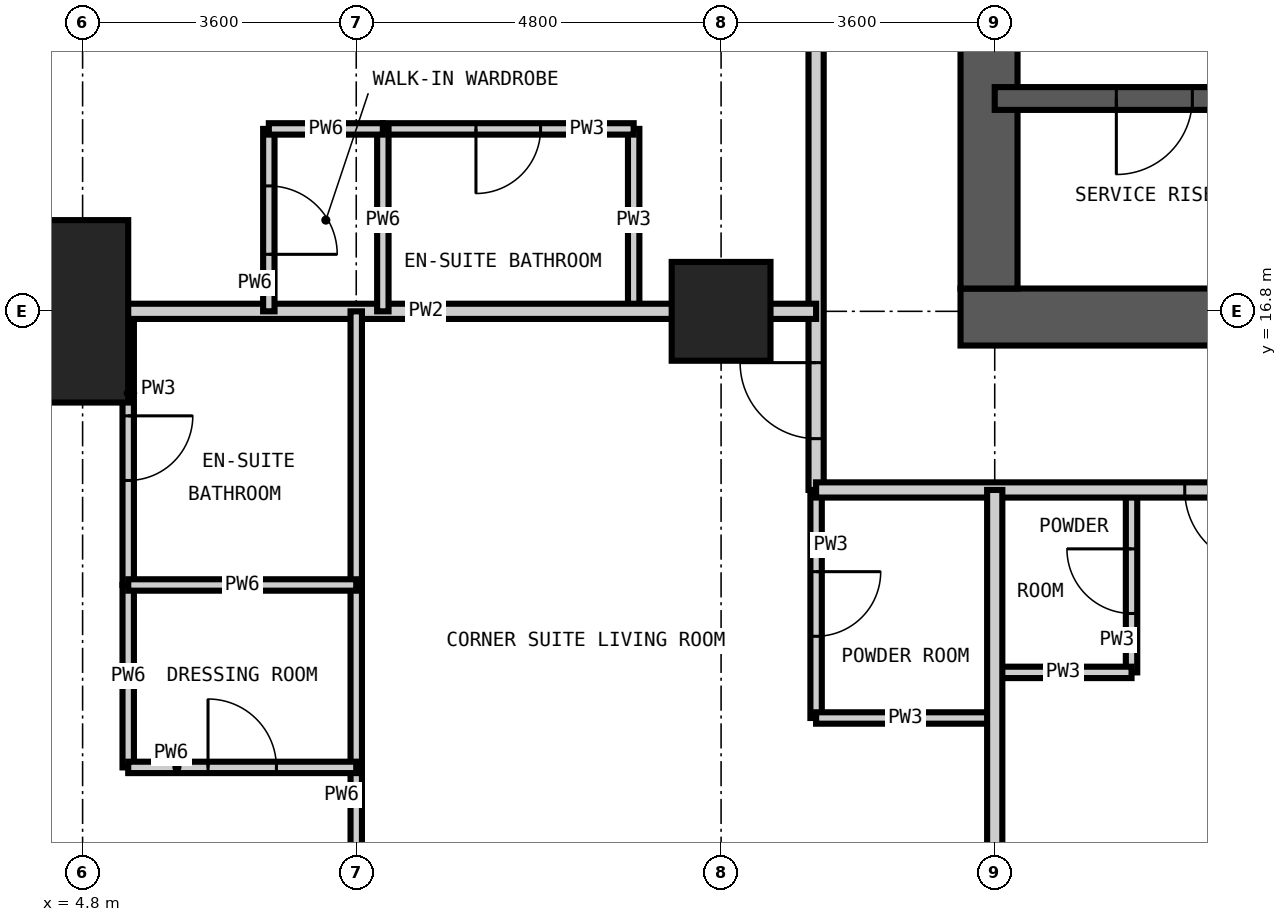
"""IFC4 building model, lengths in metres.
Left out: names, types, materials, properties, quantities, classifications, styles, units other than length and angle.
Written with IfcOpenShell. Run it as: python <this file> out.ifc"""

import sys

from ifc_helpers import new_model, si_unit, direction, frame, frame_2d, origin, origin_2d, place, context, subcontext, project, spatial, rectangle, extrude, element, fill, save


model = new_model("IFC4")
c1 = context("Model", 3, precision=1e-05, world=origin(), true_north=direction((0.0, 1.0)))
c2 = subcontext(c1, "Body", "Model", "MODEL_VIEW")
j1 = project(units=[si_unit("LENGTHUNIT", "METRE"), si_unit("PLANEANGLEUNIT", "RADIAN")], contexts=[c1])
p1 = place(None, origin())
s1 = spatial("IfcSite", under=j1, at=p1, CompositionType="ELEMENT")
p2 = place(p1, origin())
s2 = spatial("IfcBuilding", under=s1, at=p2, CompositionType="ELEMENT")
p3 = place(p2, frame((0.0, 0.0, 177.0)))
s3 = spatial("IfcBuildingStorey", under=s2, at=p3, CompositionType="ELEMENT", Elevation=177.0)
p4 = place(p3, frame((4.8, 16.8, -0.35), z_axis=(0.0, 0.0, 1.0), x_axis=(1.0, 0.0, 0.0)))
e1 = element("IfcColumn", 1, at=p4, inside=s3, PredefinedType="COLUMN", context=c2, shape_type="SweptSolid", body=[
    extrude(rectangle(XDim=1.2, YDim=2.4, at=origin_2d()), origin(), (0.0, 0.0, 1.0), 3.6),
])
p5 = place(p3, frame((13.2, 16.8, -0.35), z_axis=(0.0, 0.0, 1.0), x_axis=(1.0, 0.0, 0.0)))
e2 = element("IfcColumn", 2, at=p5, inside=s3, PredefinedType="COLUMN", context=c2, shape_type="SweptSolid", body=[
    extrude(rectangle(XDim=1.3, YDim=1.3, at=origin_2d()), origin(), (0.0, 0.0, 1.0), 3.6),
])
p6 = place(p3, frame((16.35, 16.725, -0.35), z_axis=(0.0, 0.0, 1.0), x_axis=(1.0, 0.0, 0.0)))
e3 = element("IfcWall", 3, at=p6, inside=s3, PredefinedType="SHEAR", context=c2, shape_type="SweptSolid", body=[
    extrude(rectangle(XDim=26.1, YDim=0.75, at=frame_2d((13.05, 0.0))), origin(), (0.0, 0.0, 1.0), 3.6),
])
p7 = place(p6, frame((12.55, 0.0, 0.35)))
e4 = element("IfcOpeningElement", 4, at=p7, cuts=e3, PredefinedType="OPENING", context=c2, shape_type="SweptSolid", body=[
    extrude(rectangle(XDim=1.0, YDim=2.1, at=frame_2d((0.5, 1.05))), frame((0.0, 0.385, 0.0), z_axis=(0.0, -1.0, 0.0), x_axis=(1.0, 0.0, 0.0)), (0.0, 0.0, 1.0), 0.77),
])
p8 = place(p6, frame((18.85, 0.0, 0.35)))
e5 = element("IfcOpeningElement", 5, at=p8, cuts=e3, PredefinedType="OPENING", context=c2, shape_type="SweptSolid", body=[
    extrude(rectangle(XDim=1.0, YDim=2.1, at=frame_2d((0.5, 1.05))), frame((0.0, 0.385, 0.0), z_axis=(0.0, -1.0, 0.0), x_axis=(1.0, 0.0, 0.0)), (0.0, 0.0, 1.0), 0.77),
])
p9 = place(p3, frame((16.725, 41.7, -0.35), z_axis=(0.0, 0.0, 1.0), x_axis=(0.0, -1.0, 0.0)))
e6 = element("IfcWall", 6, at=p9, inside=s3, PredefinedType="SHEAR", context=c2, shape_type="SweptSolid", body=[
    extrude(rectangle(XDim=24.6, YDim=0.75, at=frame_2d((12.3, 0.0))), origin(), (0.0, 0.0, 1.0), 3.6),
])
p10 = place(p9, frame((11.4, 0.0, 0.35)))
e7 = element("IfcOpeningElement", 7, at=p10, cuts=e6, PredefinedType="OPENING", context=c2, shape_type="SweptSolid", body=[
    extrude(rectangle(XDim=1.8, YDim=2.2, at=frame_2d((0.9, 1.1))), frame((0.0, 0.385, 0.0), z_axis=(0.0, -1.0, 0.0), x_axis=(1.0, 0.0, 0.0)), (0.0, 0.0, 1.0), 0.77),
])
p11 = place(p9, frame((20.2, 0.0, 0.35)))
e8 = element("IfcOpeningElement", 8, at=p11, cuts=e6, PredefinedType="OPENING", context=c2, shape_type="SweptSolid", body=[
    extrude(rectangle(XDim=1.0, YDim=2.1, at=frame_2d((0.5, 1.05))), frame((0.0, 0.385, 0.0), z_axis=(0.0, -1.0, 0.0), x_axis=(1.0, 0.0, 0.0)), (0.0, 0.0, 1.0), 0.77),
])
p12 = place(p9, frame((5.5, 0.0, 0.35)))
e9 = element("IfcOpeningElement", 9, at=p12, cuts=e6, PredefinedType="OPENING", context=c2, shape_type="SweptSolid", body=[
    extrude(rectangle(XDim=1.0, YDim=2.1, at=frame_2d((0.5, 1.05))), frame((0.0, 0.385, 0.0), z_axis=(0.0, -1.0, 0.0), x_axis=(1.0, 0.0, 0.0)), (0.0, 0.0, 1.0), 0.77),
])
p13 = place(p3, frame((16.8, 19.6, -0.35), z_axis=(0.0, 0.0, 1.0), x_axis=(1.0, 0.0, 0.0)))
e10 = element("IfcWall", 10, at=p13, inside=s3, PredefinedType="SHEAR", context=c2, shape_type="SweptSolid", body=[
    extrude(rectangle(XDim=8.4, YDim=0.3, at=frame_2d((4.2, 0.0))), origin(), (0.0, 0.0, 1.0), 3.6),
])
p14 = place(p13, frame((1.6, 0.0, 0.35)))
e11 = element("IfcOpeningElement", 11, at=p14, cuts=e10, PredefinedType="OPENING", context=c2, shape_type="SweptSolid", body=[
    extrude(rectangle(XDim=1.0, YDim=2.1, at=frame_2d((0.5, 1.05))), frame((0.0, 0.16, 0.0), z_axis=(0.0, -1.0, 0.0), x_axis=(1.0, 0.0, 0.0)), (0.0, 0.0, 1.0), 0.32),
])
p15 = place(p13, frame((5.8, 0.0, 0.35)))
e12 = element("IfcOpeningElement", 12, at=p15, cuts=e10, PredefinedType="OPENING", context=c2, shape_type="SweptSolid", body=[
    extrude(rectangle(XDim=1.0, YDim=2.1, at=frame_2d((0.5, 1.05))), frame((0.0, 0.16, 0.0), z_axis=(0.0, -1.0, 0.0), x_axis=(1.0, 0.0, 0.0)), (0.0, 0.0, 1.0), 0.32),
])
p16 = place(p3, frame((5.4, 13.2, 0.0), z_axis=(0.0, 0.0, 1.0), x_axis=(0.0, 1.0, 0.0)))
e13 = element("IfcWall", 13, at=p16, inside=s3, PredefinedType="PARTITIONING", context=c2, shape_type="SweptSolid", body=[
    extrude(rectangle(XDim=3.6, YDim=0.15, at=frame_2d((1.8, 0.0))), origin(), (0.0, 0.0, 1.0), 3.25),
])
p17 = place(p16, frame((1.375, 0.0, 0.0)))
e14 = element("IfcOpeningElement", 14, at=p17, cuts=e13, PredefinedType="OPENING", context=c2, shape_type="SweptSolid", body=[
    extrude(rectangle(XDim=0.85, YDim=2.1, at=frame_2d((0.425, 1.05))), frame((0.0, 0.085, 0.0), z_axis=(0.0, -1.0, 0.0), x_axis=(1.0, 0.0, 0.0)), (0.0, 0.0, 1.0), 0.17),
])
p18 = place(p3, frame((12.05, 16.8, 0.0), z_axis=(0.0, 0.0, 1.0), x_axis=(0.0, 1.0, 0.0)))
e15 = element("IfcWall", 15, at=p18, inside=s3, PredefinedType="PARTITIONING", context=c2, shape_type="SweptSolid", body=[
    extrude(rectangle(XDim=2.4, YDim=0.15, at=frame_2d((1.2, 0.0))), origin(), (0.0, 0.0, 1.0), 3.25),
])
p19 = place(p3, frame((14.45, 11.45, 0.0), z_axis=(0.0, 0.0, 1.0), x_axis=(0.0, 1.0, 0.0)))
e16 = element("IfcWall", 16, at=p19, inside=s3, PredefinedType="PARTITIONING", context=c2, shape_type="SweptSolid", body=[
    extrude(rectangle(XDim=3.0, YDim=0.15, at=frame_2d((1.5, 0.0))), origin(), (0.0, 0.0, 1.0), 3.25),
])
p20 = place(p19, frame((1.075, 0.0, 0.0)))
e17 = element("IfcOpeningElement", 17, at=p20, cuts=e16, PredefinedType="OPENING", context=c2, shape_type="SweptSolid", body=[
    extrude(rectangle(XDim=0.85, YDim=2.1, at=frame_2d((0.425, 1.05))), frame((0.0, 0.085, 0.0), z_axis=(0.0, -1.0, 0.0), x_axis=(1.0, 0.0, 0.0)), (0.0, 0.0, 1.0), 0.17),
])
p21 = place(p3, frame((18.6, 12.05, 0.0), z_axis=(0.0, 0.0, 1.0), x_axis=(0.0, 1.0, 0.0)))
e18 = element("IfcWall", 18, at=p21, inside=s3, PredefinedType="PARTITIONING", context=c2, shape_type="SweptSolid", body=[
    extrude(rectangle(XDim=2.4, YDim=0.15, at=frame_2d((1.2, 0.0))), origin(), (0.0, 0.0, 1.0), 3.25),
])
p22 = place(p21, frame((0.775, 0.0, 0.0)))
e19 = element("IfcOpeningElement", 19, at=p22, cuts=e18, PredefinedType="OPENING", context=c2, shape_type="SweptSolid", body=[
    extrude(rectangle(XDim=0.85, YDim=2.1, at=frame_2d((0.425, 1.05))), frame((0.0, 0.085, 0.0), z_axis=(0.0, -1.0, 0.0), x_axis=(1.0, 0.0, 0.0)), (0.0, 0.0, 1.0), 0.17),
])
p23 = place(p3, frame((14.45, 11.45, 0.0), z_axis=(0.0, 0.0, 1.0), x_axis=(1.0, 0.0, 0.0)))
e20 = element("IfcWall", 20, at=p23, inside=s3, PredefinedType="PARTITIONING", context=c2, shape_type="SweptSolid", body=[
    extrude(rectangle(XDim=2.35, YDim=0.15, at=frame_2d((1.175, 0.0))), origin(), (0.0, 0.0, 1.0), 3.25),
])
p24 = place(p3, frame((16.8, 12.05, 0.0), z_axis=(0.0, 0.0, 1.0), x_axis=(1.0, 0.0, 0.0)))
e21 = element("IfcWall", 21, at=p24, inside=s3, PredefinedType="PARTITIONING", context=c2, shape_type="SweptSolid", body=[
    extrude(rectangle(XDim=1.8, YDim=0.15, at=frame_2d((0.9, 0.0))), origin(), (0.0, 0.0, 1.0), 3.25),
])
p25 = place(p3, frame((8.75, 19.2, 0.0), z_axis=(0.0, 0.0, 1.0), x_axis=(1.0, 0.0, 0.0)))
e22 = element("IfcWall", 22, at=p25, inside=s3, PredefinedType="PARTITIONING", context=c2, shape_type="SweptSolid", body=[
    extrude(rectangle(XDim=3.3, YDim=0.15, at=frame_2d((1.65, 0.0))), origin(), (0.0, 0.0, 1.0), 3.25),
])
p26 = place(p25, frame((1.225, 0.0, 0.0)))
e23 = element("IfcOpeningElement", 23, at=p26, cuts=e22, PredefinedType="OPENING", context=c2, shape_type="SweptSolid", body=[
    extrude(rectangle(XDim=0.85, YDim=2.1, at=frame_2d((0.425, 1.05))), frame((0.0, 0.085, 0.0), z_axis=(0.0, -1.0, 0.0), x_axis=(1.0, 0.0, 0.0)), (0.0, 0.0, 1.0), 0.17),
])
p27 = place(p3, frame((14.45, 14.45, 0.0), z_axis=(0.0, 0.0, 1.0), x_axis=(0.0, 1.0, 0.0)))
e24 = element("IfcWall", 24, at=p27, inside=s3, PredefinedType="PARTITIONING", context=c2, shape_type="SweptSolid", body=[
    extrude(rectangle(XDim=31.1, YDim=0.2, at=frame_2d((15.55, 0.0))), origin(), (0.0, 0.0, 1.0), 3.25),
])
p28 = place(p27, frame((6.05, 0.0, 0.0)))
e25 = element("IfcOpeningElement", 25, at=p28, cuts=e24, PredefinedType="OPENING", context=c2, shape_type="SweptSolid", body=[
    extrude(rectangle(XDim=1.0, YDim=2.2, at=frame_2d((0.5, 1.1))), frame((0.0, 0.11, 0.0), z_axis=(0.0, -1.0, 0.0), x_axis=(1.0, 0.0, 0.0)), (0.0, 0.0, 1.0), 0.22),
])
p29 = place(p27, frame((11.95, 0.0, 0.0)))
e26 = element("IfcOpeningElement", 26, at=p29, cuts=e24, PredefinedType="OPENING", context=c2, shape_type="SweptSolid", body=[
    extrude(rectangle(XDim=1.8, YDim=2.4, at=frame_2d((0.9, 1.2))), frame((0.0, 0.11, 0.0), z_axis=(0.0, -1.0, 0.0), x_axis=(1.0, 0.0, 0.0)), (0.0, 0.0, 1.0), 0.22),
])
p30 = place(p27, frame((19.575, 0.0, 0.0)))
e27 = element("IfcOpeningElement", 27, at=p30, cuts=e24, PredefinedType="OPENING", context=c2, shape_type="SweptSolid", body=[
    extrude(rectangle(XDim=1.0, YDim=2.2, at=frame_2d((0.5, 1.1))), frame((0.0, 0.11, 0.0), z_axis=(0.0, -1.0, 0.0), x_axis=(1.0, 0.0, 0.0)), (0.0, 0.0, 1.0), 0.22),
])
p31 = place(p27, frame((24.95, 0.0, 0.0)))
e28 = element("IfcOpeningElement", 28, at=p31, cuts=e24, PredefinedType="OPENING", context=c2, shape_type="SweptSolid", body=[
    extrude(rectangle(XDim=1.0, YDim=2.2, at=frame_2d((0.5, 1.1))), frame((0.0, 0.11, 0.0), z_axis=(0.0, -1.0, 0.0), x_axis=(1.0, 0.0, 0.0)), (0.0, 0.0, 1.0), 0.22),
])
p32 = place(p27, frame((0.675, 0.0, 0.0)))
e29 = element("IfcOpeningElement", 29, at=p32, cuts=e24, PredefinedType="OPENING", context=c2, shape_type="SweptSolid", body=[
    extrude(rectangle(XDim=1.0, YDim=2.2, at=frame_2d((0.5, 1.1))), frame((0.0, 0.11, 0.0), z_axis=(0.0, -1.0, 0.0), x_axis=(1.0, 0.0, 0.0)), (0.0, 0.0, 1.0), 0.22),
])
p33 = place(p27, frame((28.825, 0.0, 0.0)))
e30 = element("IfcOpeningElement", 30, at=p33, cuts=e24, PredefinedType="OPENING", context=c2, shape_type="SweptSolid", body=[
    extrude(rectangle(XDim=1.0, YDim=2.2, at=frame_2d((0.5, 1.1))), frame((0.0, 0.11, 0.0), z_axis=(0.0, -1.0, 0.0), x_axis=(1.0, 0.0, 0.0)), (0.0, 0.0, 1.0), 0.22),
])
p34 = place(p3, frame((44.95, 14.45, 0.0), z_axis=(0.0, 0.0, 1.0), x_axis=(-1.0, 0.0, 0.0)))
e31 = element("IfcWall", 31, at=p34, inside=s3, PredefinedType="PARTITIONING", context=c2, shape_type="SweptSolid", body=[
    extrude(rectangle(XDim=30.5, YDim=0.2, at=frame_2d((15.25, 0.0))), origin(), (0.0, 0.0, 1.0), 3.25),
])
p35 = place(p34, frame((24.65, 0.0, 0.0)))
e32 = element("IfcOpeningElement", 32, at=p35, cuts=e31, PredefinedType="OPENING", context=c2, shape_type="SweptSolid", body=[
    extrude(rectangle(XDim=1.0, YDim=2.2, at=frame_2d((0.5, 1.1))), frame((0.0, 0.11, 0.0), z_axis=(0.0, -1.0, 0.0), x_axis=(1.0, 0.0, 0.0)), (0.0, 0.0, 1.0), 0.22),
])
p36 = place(p34, frame((13.85, 0.0, 0.0)))
e33 = element("IfcOpeningElement", 33, at=p36, cuts=e31, PredefinedType="OPENING", context=c2, shape_type="SweptSolid", body=[
    extrude(rectangle(XDim=1.0, YDim=2.2, at=frame_2d((0.5, 1.1))), frame((0.0, 0.11, 0.0), z_axis=(0.0, -1.0, 0.0), x_axis=(1.0, 0.0, 0.0)), (0.0, 0.0, 1.0), 0.22),
])
p37 = place(p34, frame((7.85, 0.0, 0.0)))
e34 = element("IfcOpeningElement", 34, at=p37, cuts=e31, PredefinedType="OPENING", context=c2, shape_type="SweptSolid", body=[
    extrude(rectangle(XDim=1.0, YDim=2.2, at=frame_2d((0.5, 1.1))), frame((0.0, 0.11, 0.0), z_axis=(0.0, -1.0, 0.0), x_axis=(1.0, 0.0, 0.0)), (0.0, 0.0, 1.0), 0.22),
])
for number, where, z_axis, x_axis in (
    (35, (16.8, 4.182, 0.0), (0.0, 0.0, 1.0), (0.0, 1.0, 0.0)),
    (36, (4.182, 16.8, 0.0), (0.0, 0.0, 1.0), (1.0, 0.0, 0.0)),
):
    element("IfcWall", number, at=place(p3, frame(where, z_axis=z_axis, x_axis=x_axis)), inside=s3, PredefinedType="PARTITIONING", context=c2, shape_type="SweptSolid", body=[
        extrude(rectangle(XDim=10.268, YDim=0.2, at=frame_2d((5.134, 0.0))), origin(), (0.0, 0.0, 1.0), 3.25),
    ])
p38 = place(p3, frame((5.4, 10.8, 0.0), z_axis=(0.0, 0.0, 1.0), x_axis=(0.0, 1.0, 0.0)))
e37 = element("IfcWall", 37, at=p38, inside=s3, PredefinedType="PARTITIONING", context=c2, shape_type="SweptSolid", body=[
    extrude(rectangle(XDim=2.4, YDim=0.15, at=frame_2d((1.2, 0.0))), origin(), (0.0, 0.0, 1.0), 3.25),
])
p39 = place(p3, frame((7.25, 16.8, 0.0), z_axis=(0.0, 0.0, 1.0), x_axis=(0.0, 1.0, 0.0)))
e38 = element("IfcWall", 38, at=p39, inside=s3, PredefinedType="PARTITIONING", context=c2, shape_type="SweptSolid", body=[
    extrude(rectangle(XDim=2.4, YDim=0.15, at=frame_2d((1.2, 0.0))), origin(), (0.0, 0.0, 1.0), 3.25),
])
p40 = place(p39, frame((0.75, 0.0, 0.0)))
e39 = element("IfcOpeningElement", 39, at=p40, cuts=e38, PredefinedType="OPENING", context=c2, shape_type="SweptSolid", body=[
    extrude(rectangle(XDim=0.9, YDim=2.1, at=frame_2d((0.45, 1.05))), frame((0.0, 0.085, 0.0), z_axis=(0.0, -1.0, 0.0), x_axis=(1.0, 0.0, 0.0)), (0.0, 0.0, 1.0), 0.17),
])
p41 = place(p3, frame((8.4, 4.182, 0.0), z_axis=(0.0, 0.0, 1.0), x_axis=(0.0, 1.0, 0.0)))
e40 = element("IfcWall", 40, at=p41, inside=s3, PredefinedType="PARTITIONING", context=c2, shape_type="SweptSolid", body=[
    extrude(rectangle(XDim=12.618, YDim=0.15, at=frame_2d((6.309, 0.0))), origin(), (0.0, 0.0, 1.0), 3.25),
])
p42 = place(p41, frame((2.868, 0.0, 0.0)))
e41 = element("IfcOpeningElement", 41, at=p42, cuts=e40, PredefinedType="OPENING", context=c2, shape_type="SweptSolid", body=[
    extrude(rectangle(XDim=0.9, YDim=2.1, at=frame_2d((0.45, 1.05))), frame((0.0, 0.085, 0.0), z_axis=(0.0, -1.0, 0.0), x_axis=(1.0, 0.0, 0.0)), (0.0, 0.0, 1.0), 0.17),
])
p43 = place(p3, frame((8.75, 16.8, 0.0), z_axis=(0.0, 0.0, 1.0), x_axis=(0.0, 1.0, 0.0)))
e42 = element("IfcWall", 42, at=p43, inside=s3, PredefinedType="PARTITIONING", context=c2, shape_type="SweptSolid", body=[
    extrude(rectangle(XDim=2.4, YDim=0.15, at=frame_2d((1.2, 0.0))), origin(), (0.0, 0.0, 1.0), 3.25),
])
p44 = place(p3, frame((5.4, 10.8, 0.0), z_axis=(0.0, 0.0, 1.0), x_axis=(1.0, 0.0, 0.0)))
e43 = element("IfcWall", 43, at=p44, inside=s3, PredefinedType="PARTITIONING", context=c2, shape_type="SweptSolid", body=[
    extrude(rectangle(XDim=3.0, YDim=0.15, at=frame_2d((1.5, 0.0))), origin(), (0.0, 0.0, 1.0), 3.25),
])
p45 = place(p44, frame((1.05, 0.0, 0.0)))
e44 = element("IfcOpeningElement", 44, at=p45, cuts=e43, PredefinedType="OPENING", context=c2, shape_type="SweptSolid", body=[
    extrude(rectangle(XDim=0.9, YDim=2.1, at=frame_2d((0.45, 1.05))), frame((0.0, 0.085, 0.0), z_axis=(0.0, -1.0, 0.0), x_axis=(1.0, 0.0, 0.0)), (0.0, 0.0, 1.0), 0.17),
])
p46 = place(p3, frame((5.4, 13.2, 0.0), z_axis=(0.0, 0.0, 1.0), x_axis=(1.0, 0.0, 0.0)))
e45 = element("IfcWall", 45, at=p46, inside=s3, PredefinedType="PARTITIONING", context=c2, shape_type="SweptSolid", body=[
    extrude(rectangle(XDim=3.0, YDim=0.15, at=frame_2d((1.5, 0.0))), origin(), (0.0, 0.0, 1.0), 3.25),
])
p47 = place(p3, frame((7.25, 19.2, 0.0), z_axis=(0.0, 0.0, 1.0), x_axis=(1.0, 0.0, 0.0)))
e46 = element("IfcWall", 46, at=p47, inside=s3, PredefinedType="PARTITIONING", context=c2, shape_type="SweptSolid", body=[
    extrude(rectangle(XDim=1.5, YDim=0.15, at=frame_2d((0.75, 0.0))), origin(), (0.0, 0.0, 1.0), 3.25),
])
p48 = place(p35, origin())
e47 = element("IfcDoor", 47, at=p48, inside=s3, OperationType="SINGLE_SWING_LEFT", PredefinedType="DOOR", context=c2, shape_type="SweptSolid", body=[
    extrude(rectangle(XDim=1.0, YDim=2.2, at=frame_2d((0.5, 1.1))), frame((0.0, 0.025, 0.0), z_axis=(0.0, -1.0, 0.0), x_axis=(1.0, 0.0, 0.0)), (0.0, 0.0, 1.0), 0.05),
])
fill(e32, e47)
p49 = place(p22, origin())
e48 = element("IfcDoor", 48, at=p49, inside=s3, OperationType="SINGLE_SWING_RIGHT", PredefinedType="DOOR", context=c2, shape_type="SweptSolid", body=[
    extrude(rectangle(XDim=0.85, YDim=2.1, at=frame_2d((0.425, 1.05))), frame((0.0, 0.025, 0.0), z_axis=(0.0, -1.0, 0.0), x_axis=(1.0, 0.0, 0.0)), (0.0, 0.0, 1.0), 0.05),
])
fill(e19, e48)
p50 = place(p26, frame((0.85, 0.0, 0.0), z_axis=(0.0, 0.0, 1.0), x_axis=(-1.0, 0.0, 0.0)))
e49 = element("IfcDoor", 49, at=p50, inside=s3, OperationType="SINGLE_SWING_RIGHT", PredefinedType="DOOR", context=c2, shape_type="SweptSolid", body=[
    extrude(rectangle(XDim=0.85, YDim=2.1, at=frame_2d((0.425, 1.05))), frame((0.0, 0.025, 0.0), z_axis=(0.0, -1.0, 0.0), x_axis=(1.0, 0.0, 0.0)), (0.0, 0.0, 1.0), 0.05),
])
fill(e23, e49)
p51 = place(p40, frame((0.9, 0.0, 0.0), z_axis=(0.0, 0.0, 1.0), x_axis=(-1.0, 0.0, 0.0)))
e50 = element("IfcDoor", 50, at=p51, inside=s3, OperationType="SINGLE_SWING_RIGHT", PredefinedType="DOOR", context=c2, shape_type="SweptSolid", body=[
    extrude(rectangle(XDim=0.9, YDim=2.1, at=frame_2d((0.45, 1.05))), frame((0.0, 0.025, 0.0), z_axis=(0.0, -1.0, 0.0), x_axis=(1.0, 0.0, 0.0)), (0.0, 0.0, 1.0), 0.05),
])
fill(e39, e50)
p52 = place(p32, origin())
e51 = element("IfcDoor", 51, at=p52, inside=s3, OperationType="SINGLE_SWING_RIGHT", PredefinedType="DOOR", context=c2, shape_type="SweptSolid", body=[
    extrude(rectangle(XDim=1.0, YDim=2.2, at=frame_2d((0.5, 1.1))), frame((0.0, 0.025, 0.0), z_axis=(0.0, -1.0, 0.0), x_axis=(1.0, 0.0, 0.0)), (0.0, 0.0, 1.0), 0.05),
])
fill(e29, e51)
p53 = place(p20, frame((0.85, 0.0, 0.0), z_axis=(0.0, 0.0, 1.0), x_axis=(-1.0, 0.0, 0.0)))
e52 = element("IfcDoor", 52, at=p53, inside=s3, OperationType="SINGLE_SWING_LEFT", PredefinedType="DOOR", context=c2, shape_type="SweptSolid", body=[
    extrude(rectangle(XDim=0.85, YDim=2.1, at=frame_2d((0.425, 1.05))), frame((0.0, 0.025, 0.0), z_axis=(0.0, -1.0, 0.0), x_axis=(1.0, 0.0, 0.0)), (0.0, 0.0, 1.0), 0.05),
])
fill(e17, e52)
p54 = place(p17, frame((0.85, 0.0, 0.0), z_axis=(0.0, 0.0, 1.0), x_axis=(-1.0, 0.0, 0.0)))
e53 = element("IfcDoor", 53, at=p54, inside=s3, OperationType="SINGLE_SWING_LEFT", PredefinedType="DOOR", context=c2, shape_type="SweptSolid", body=[
    extrude(rectangle(XDim=0.85, YDim=2.1, at=frame_2d((0.425, 1.05))), frame((0.0, 0.025, 0.0), z_axis=(0.0, -1.0, 0.0), x_axis=(1.0, 0.0, 0.0)), (0.0, 0.0, 1.0), 0.05),
])
fill(e14, e53)
p55 = place(p45, origin())
e54 = element("IfcDoor", 54, at=p55, inside=s3, OperationType="SINGLE_SWING_LEFT", PredefinedType="DOOR", context=c2, shape_type="SweptSolid", body=[
    extrude(rectangle(XDim=0.9, YDim=2.1, at=frame_2d((0.45, 1.05))), frame((0.0, 0.025, 0.0), z_axis=(0.0, -1.0, 0.0), x_axis=(1.0, 0.0, 0.0)), (0.0, 0.0, 1.0), 0.05),
])
fill(e44, e54)
p56 = place(p14, frame((1.0, 0.0, 0.0), z_axis=(0.0, 0.0, 1.0), x_axis=(-1.0, 0.0, 0.0)))
e55 = element("IfcDoor", 55, at=p56, inside=s3, OperationType="SINGLE_SWING_RIGHT", PredefinedType="DOOR", context=c2, shape_type="SweptSolid", body=[
    extrude(rectangle(XDim=1.0, YDim=2.1, at=frame_2d((0.5, 1.05))), frame((0.0, 0.025, 0.0), z_axis=(0.0, -1.0, 0.0), x_axis=(1.0, 0.0, 0.0)), (0.0, 0.0, 1.0), 0.05),
])
fill(e11, e55)
save(model, sys.argv[1])
